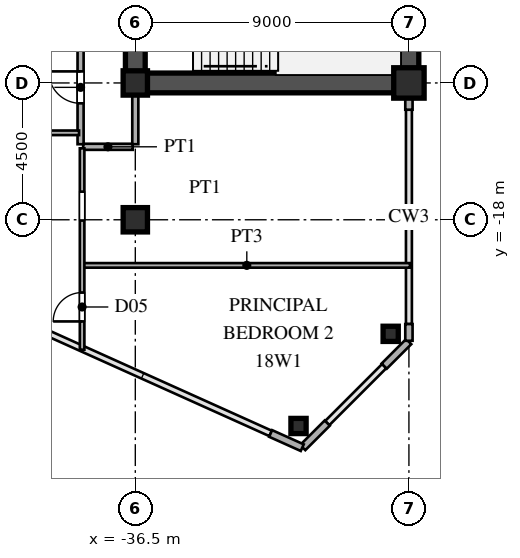
"""IFC4 building model, lengths in metres.
Left out: names, types, materials, properties, quantities, classifications, styles, units other than length and angle.
Written with IfcOpenShell. Run it as: python <this file> out.ifc"""

import sys

from ifc_helpers import new_model, si_unit, direction, frame, frame_2d, origin, origin_2d, place, context, subcontext, project, spatial, rectangle, hollow_rectangle, i_section, extrude, source, transform, mapped, element, fill, save


model = new_model("IFC4")
c1 = context("Model", 3, precision=1e-05, world=origin(), true_north=direction((0.0, 1.0)))
c2 = subcontext(c1, "Body", "Model", "MODEL_VIEW")
j1 = project(units=[si_unit("LENGTHUNIT", "METRE"), si_unit("PLANEANGLEUNIT", "RADIAN")], contexts=[c1])
p1 = place(None, origin())
s1 = spatial("IfcSite", under=j1, at=p1, CompositionType="ELEMENT")
p2 = place(p1, origin())
s2 = spatial("IfcBuilding", under=s1, at=p2, CompositionType="ELEMENT")
p3 = place(p2, frame((0.0, 0.0, 69.3)))
s3 = spatial("IfcBuildingStorey", under=s2, at=p3, CompositionType="ELEMENT", Elevation=69.3)
m1 = source(origin(), c2, "Body", "SweptSolid", [
    extrude(hollow_rectangle(XDim=1.0, YDim=1.0, WallThickness=0.042, at=origin_2d()), origin(), (0.0, 0.0, 1.0), 3.6),
])
p4 = place(p3, frame((-27.5, -13.5, 0.0), z_axis=(0.0, 0.0, 1.0), x_axis=(1.0, 0.0, 0.0)))
e1 = element("IfcColumn", 1, at=p4, inside=s3, PredefinedType="COLUMN", context=c2, shape_type="MappedRepresentation", body=[
    mapped(m1, transform((0.0, 0.0, 0.0), scale=1.0)),
])
m2 = source(origin(), c2, "Body", "SweptSolid", [
    extrude(i_section(OverallWidth=0.8, OverallDepth=0.8, WebThickness=0.032, FlangeThickness=0.05, at=origin_2d()), origin(), (0.0, 0.0, 1.0), 3.6),
])
for number, where, z_axis, x_axis in (
    (2, (-36.5, -18.0, 0.0), (0.0, 0.0, 1.0), (1.0, 0.0, 0.0)),
    (3, (-36.5, -13.5, 0.0), (0.0, 0.0, 1.0), (1.0, 0.0, 0.0)),
):
    element("IfcColumn", number, at=place(p3, frame(where, z_axis=z_axis, x_axis=x_axis)), inside=s3, PredefinedType="COLUMN", context=c2, shape_type="MappedRepresentation", body=[
        mapped(m2, transform((0.0, 0.0, 0.0), scale=1.0)),
    ])
m3 = source(origin(), c2, "Body", "SweptSolid", [
    extrude(hollow_rectangle(XDim=0.5, YDim=0.5, WallThickness=0.02, at=origin_2d()), origin(), (0.0, 0.0, 1.0), 3.6),
])
for number, where, z_axis, x_axis in (
    (4, (-28.1, -21.751, 0.0), (0.0, 0.0, 1.0), (1.0, 0.0, 0.0)),
    (5, (-31.131, -24.783, 0.0), (0.0, 0.0, 1.0), (1.0, 0.0, 0.0)),
):
    element("IfcColumn", number, at=place(p3, frame(where, z_axis=z_axis, x_axis=x_axis)), inside=s3, PredefinedType="COLUMN", context=c2, shape_type="MappedRepresentation", body=[
        mapped(m3, transform((0.0, 0.0, 0.0), scale=1.0)),
    ])
p5 = place(p3, frame((-27.5, -21.98, 0.0), z_axis=(0.0, 0.0, 1.0), x_axis=(0.0, 1.0, 0.0)))
e6 = element("IfcWall", 6, at=p5, inside=s3, PredefinedType="SOLIDWALL", context=c2, shape_type="SweptSolid", body=[
    extrude(rectangle(XDim=0.55, YDim=0.24, at=frame_2d((0.275, 0.0))), origin(), (0.0, 0.0, 1.0), 3.38),
])
p6 = place(p3, frame((-27.5, -14.38, 0.0), z_axis=(0.0, 0.0, 1.0), x_axis=(0.0, 1.0, 0.0)))
e7 = element("IfcWall", 7, at=p6, inside=s3, PredefinedType="SOLIDWALL", context=c2, shape_type="SweptSolid", body=[
    extrude(rectangle(XDim=0.55, YDim=0.24, at=frame_2d((0.275, 0.0))), origin(), (0.0, 0.0, 1.0), 2.88),
])
p7 = place(p3, frame((-32.049, -25.028, 0.0), z_axis=(0.0, 0.0, 1.0), x_axis=(0.911929519623, -0.410346866979, 0.0)))
e8 = element("IfcWall", 8, at=p7, inside=s3, PredefinedType="SOLIDWALL", context=c2, shape_type="SweptSolid", body=[
    extrude(rectangle(XDim=1.14, YDim=0.24, at=frame_2d((0.57, 0.0))), origin(), (0.0, 0.0, 1.0), 3.38),
])
for number, where, z_axis, x_axis in (
    (9, (-30.993, -25.493, 0.0), (0.0, 0.0, 1.0), (0.707, 0.707, 0.0)),
    (10, (-28.313, -22.813, 0.0), (0.0, 0.0, 1.0), (0.707, 0.707, 0.0)),
):
    element("IfcWall", number, at=place(p3, frame(where, z_axis=z_axis, x_axis=x_axis)), inside=s3, PredefinedType="SOLIDWALL", context=c2, shape_type="SweptSolid", body=[
        extrude(rectangle(XDim=1.14, YDim=0.24, at=frame_2d((0.57, 0.0))), origin(), (0.0, 0.0, 1.0), 3.38),
    ])
p8 = place(p3, frame((-27.5, -13.5, 0.0), z_axis=(0.0, 0.0, 1.0), x_axis=(0.0, 1.0, 0.0)))
e11 = element("IfcWall", 11, at=p8, inside=s3, PredefinedType="SHEAR", context=c2, shape_type="SweptSolid", body=[
    extrude(rectangle(XDim=12.2, YDim=0.65, at=frame_2d((6.1, 0.0))), origin(), (0.0, 0.0, 1.0), 3.38),
])
p9 = place(p3, frame((-36.5, -13.5, 0.0), z_axis=(0.0, 0.0, 1.0), x_axis=(1.0, 0.0, 0.0)))
e12 = element("IfcWall", 12, at=p9, inside=s3, PredefinedType="SHEAR", context=c2, shape_type="SweptSolid", body=[
    extrude(rectangle(XDim=9.0, YDim=0.65, at=frame_2d((4.5, 0.0))), origin(), (0.0, 0.0, 1.0), 3.38),
])
p10 = place(p3, frame((-36.5, -13.65, 0.0), z_axis=(0.0, 0.0, 1.0), x_axis=(0.0, 1.0, 0.0)))
e13 = element("IfcWall", 13, at=p10, inside=s3, PredefinedType="SHEAR", context=c2, shape_type="SweptSolid", body=[
    extrude(rectangle(XDim=7.15, YDim=0.65, at=frame_2d((3.575, 0.0))), origin(), (0.0, 0.0, 1.0), 3.38),
])
p11 = place(p10, frame((4.675, 0.0, 0.0)))
e14 = element("IfcOpeningElement", 14, at=p11, cuts=e13, PredefinedType="OPENING", context=c2, shape_type="SweptSolid", body=[
    extrude(rectangle(XDim=1.15, YDim=2.2, at=frame_2d((0.575, 1.1))), frame((0.0, 0.335, 0.0), z_axis=(0.0, -1.0, 0.0), x_axis=(1.0, 0.0, 0.0)), (0.0, 0.0, 1.0), 0.67),
])
p12 = place(p3, frame((-38.2, -19.5, 0.0), z_axis=(0.0, 0.0, 1.0), x_axis=(1.0, 0.0, 0.0)))
e15 = element("IfcWall", 15, at=p12, inside=s3, PredefinedType="PARTITIONING", context=c2, shape_type="SweptSolid", body=[
    extrude(rectangle(XDim=10.735, YDim=0.15, at=frame_2d((5.367, 0.0))), origin(), (0.0, 0.0, 1.0), 3.38),
])
p13 = place(p3, frame((-38.215, -15.6, 0.0), z_axis=(0.0, 0.0, 1.0), x_axis=(1.0, 0.0, 0.0)))
e16 = element("IfcWall", 16, at=p13, inside=s3, PredefinedType="PARTITIONING", context=c2, shape_type="SweptSolid", body=[
    extrude(rectangle(XDim=1.63, YDim=0.2, at=frame_2d((0.815, 0.0))), origin(), (0.0, 0.0, 1.0), 3.38),
])
p14 = place(p3, frame((-44.4, -15.14, 0.0), z_axis=(0.0, 0.0, 1.0), x_axis=(1.0, 0.0, 0.0)))
e17 = element("IfcWall", 17, at=p14, inside=s3, PredefinedType="PARTITIONING", context=c2, shape_type="SweptSolid", body=[
    extrude(rectangle(XDim=6.05, YDim=0.15, at=frame_2d((3.025, 0.0))), origin(), (0.0, 0.0, 1.0), 3.38),
])
p15 = place(p14, frame((2.55, 0.0, 0.0)))
e18 = element("IfcOpeningElement", 18, at=p15, cuts=e17, PredefinedType="OPENING", context=c2, shape_type="SweptSolid", body=[
    extrude(rectangle(XDim=0.95, YDim=2.15, at=frame_2d((0.475, 1.075))), frame((0.0, 0.085, 0.0), z_axis=(0.0, -1.0, 0.0), x_axis=(1.0, 0.0, 0.0)), (0.0, 0.0, 1.0), 0.17),
])
p16 = place(p3, frame((-38.3, -15.515, 0.0), z_axis=(0.0, 0.0, 1.0), x_axis=(0.0, 1.0, 0.0)))
e19 = element("IfcWall", 19, at=p16, inside=s3, PredefinedType="PARTITIONING", context=c2, shape_type="SweptSolid", body=[
    extrude(rectangle(XDim=31.03, YDim=0.2, at=frame_2d((15.515, 0.0))), origin(), (0.0, 0.0, 1.0), 3.38),
])
p17 = place(p16, frame((1.345, 0.0, 0.0)))
e20 = element("IfcOpeningElement", 20, at=p17, cuts=e19, PredefinedType="OPENING", context=c2, shape_type="SweptSolid", body=[
    extrude(rectangle(XDim=1.05, YDim=2.25, at=frame_2d((0.525, 1.125))), frame((0.0, 0.11, 0.0), z_axis=(0.0, -1.0, 0.0), x_axis=(1.0, 0.0, 0.0)), (0.0, 0.0, 1.0), 0.22),
])
p18 = place(p16, frame((12.28, 0.0, 0.0)))
e21 = element("IfcOpeningElement", 21, at=p18, cuts=e19, PredefinedType="OPENING", context=c2, shape_type="SweptSolid", body=[
    extrude(rectangle(XDim=1.05, YDim=2.25, at=frame_2d((0.525, 1.125))), frame((0.0, 0.11, 0.0), z_axis=(0.0, -1.0, 0.0), x_axis=(1.0, 0.0, 0.0)), (0.0, 0.0, 1.0), 0.22),
])
p19 = place(p16, frame((25.067, 0.0, 0.0)))
e22 = element("IfcOpeningElement", 22, at=p19, cuts=e19, PredefinedType="OPENING", context=c2, shape_type="SweptSolid", body=[
    extrude(rectangle(XDim=1.05, YDim=2.25, at=frame_2d((0.525, 1.125))), frame((0.0, 0.11, 0.0), z_axis=(0.0, -1.0, 0.0), x_axis=(1.0, 0.0, 0.0)), (0.0, 0.0, 1.0), 0.22),
])
p20 = place(p3, frame((-38.25, -22.273, 0.0), z_axis=(0.0, 0.0, 1.0), x_axis=(0.0, 1.0, 0.0)))
e23 = element("IfcWall", 23, at=p20, inside=s3, PredefinedType="PARTITIONING", context=c2, shape_type="SweptSolid", body=[
    extrude(rectangle(XDim=6.623, YDim=0.15, at=frame_2d((3.312, 0.0))), origin(), (0.0, 0.0, 1.0), 3.38),
])
p21 = place(p20, frame((0.929, 0.0, 0.0)))
e24 = element("IfcOpeningElement", 24, at=p21, cuts=e23, PredefinedType="OPENING", context=c2, shape_type="SweptSolid", body=[
    extrude(rectangle(XDim=0.95, YDim=2.15, at=frame_2d((0.475, 1.075))), frame((0.0, 0.085, 0.0), z_axis=(0.0, -1.0, 0.0), x_axis=(1.0, 0.0, 0.0)), (0.0, 0.0, 1.0), 0.17),
])
p22 = place(p20, frame((4.248, 0.0, 0.0)))
e25 = element("IfcOpeningElement", 25, at=p22, cuts=e23, PredefinedType="OPENING", context=c2, shape_type="SweptSolid", body=[
    extrude(rectangle(XDim=0.95, YDim=2.15, at=frame_2d((0.475, 1.075))), frame((0.0, 0.085, 0.0), z_axis=(0.0, -1.0, 0.0), x_axis=(1.0, 0.0, 0.0)), (0.0, 0.0, 1.0), 0.17),
])
p23 = place(p3, frame((-36.5, -15.515, 0.0), z_axis=(0.0, 0.0, 1.0), x_axis=(0.0, 1.0, 0.0)))
e26 = element("IfcWall", 26, at=p23, inside=s3, PredefinedType="PARTITIONING", context=c2, shape_type="SweptSolid", body=[
    extrude(rectangle(XDim=1.685, YDim=0.2, at=frame_2d((0.842, 0.0))), origin(), (0.0, 0.0, 1.0), 2.68),
])
m4 = source(origin(), c2, "Body", "SweptSolid", [
    extrude(rectangle(XDim=1.05, YDim=2.25, at=frame_2d((0.525, 1.125))), frame((0.0, 0.025, 0.0), z_axis=(0.0, -1.0, 0.0), x_axis=(1.0, 0.0, 0.0)), (0.0, 0.0, 1.0), 0.05),
])
p24 = place(p17, origin())
e27 = element("IfcDoor", 27, at=p24, inside=s3, OperationType="SINGLE_SWING_RIGHT", PredefinedType="DOOR", context=c2, shape_type="MappedRepresentation", body=[
    mapped(m4, transform((0.0, 0.0, 0.0), scale=1.0)),
])
fill(e20, e27)
m5 = source(origin(), c2, "Body", "SweptSolid", [
    extrude(rectangle(XDim=0.95, YDim=2.15, at=frame_2d((0.475, 1.075))), frame((0.0, 0.025, 0.0), z_axis=(0.0, -1.0, 0.0), x_axis=(1.0, 0.0, 0.0)), (0.0, 0.0, 1.0), 0.05),
])
p25 = place(p21, origin())
e28 = element("IfcDoor", 28, at=p25, inside=s3, OperationType="SINGLE_SWING_LEFT", PredefinedType="DOOR", context=c2, shape_type="MappedRepresentation", body=[
    mapped(m5, transform((0.0, 0.0, 0.0), scale=1.0)),
])
fill(e24, e28)
save(model, sys.argv[1])
